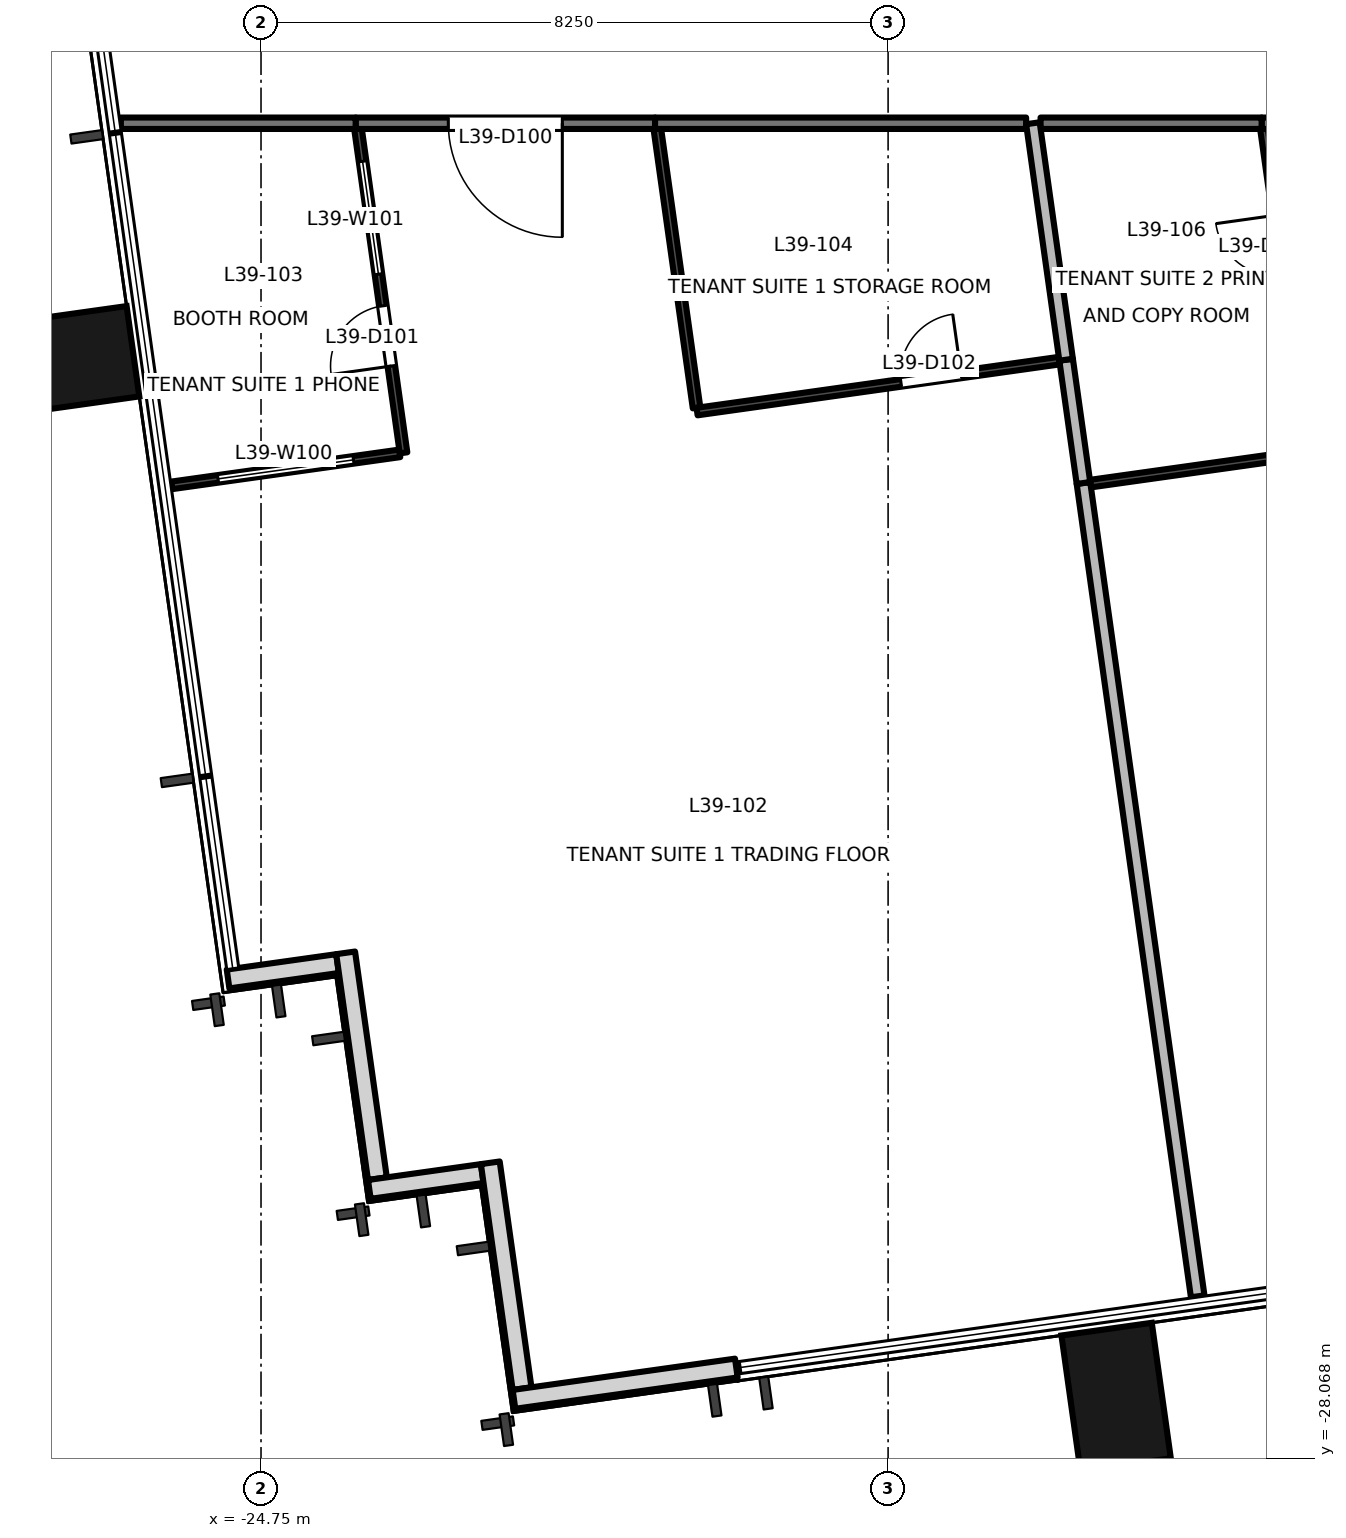
"""IFC4 building model, lengths in metres.
Left out: names, types, materials, properties, quantities, classifications, styles, units other than length and angle.
Written with IfcOpenShell. Run it as: python <this file> out.ifc"""

import sys

from ifc_helpers import new_model, si_unit, direction, frame, frame_2d, origin, origin_2d, place, context, subcontext, project, spatial, rectangle, extrude, element, fill, save


model = new_model("IFC4")
c1 = context("Model", 3, precision=1e-05, world=origin(), true_north=direction((0.0, 1.0)))
c2 = subcontext(c1, "Body", "Model", "MODEL_VIEW")
j1 = project(units=[si_unit("LENGTHUNIT", "METRE"), si_unit("PLANEANGLEUNIT", "RADIAN")], contexts=[c1])
p1 = place(None, origin())
s1 = spatial("IfcSite", under=j1, at=p1, CompositionType="ELEMENT")
p2 = place(p1, origin())
s2 = spatial("IfcBuilding", under=s1, at=p2, CompositionType="ELEMENT")
p3 = place(p2, frame((0.0, 0.0, 172.4)))
s3 = spatial("IfcBuildingStorey", under=s2, at=p3, CompositionType="ELEMENT", Elevation=172.4)
for number, where, z_axis, x_axis in (
    (1, (-13.5, -27.256, -0.2), (0.0, 0.0, 1.0), (0.99, 0.139, 0.0)),
    (2, (-27.326, -13.625, -0.2), (0.0, 0.0, 1.0), (-0.139, 0.99, 0.0)),
):
    element("IfcColumn", number, at=place(p3, frame(where, z_axis=z_axis, x_axis=x_axis)), inside=s3, PredefinedType="COLUMN", context=c2, shape_type="SweptSolid", body=[
        extrude(rectangle(XDim=1.2, YDim=1.8, at=origin_2d()), origin(), (0.0, 0.0, 1.0), 3.9),
    ])
p4 = place(p3, frame((-25.184, -21.758, 0.0), z_axis=(0.0, 0.0, 1.0), x_axis=(0.9902493448, 0.13930626376, 0.0)))
e3 = element("IfcWall", 3, at=p4, inside=s3, PredefinedType="SOLIDWALL", context=c2, shape_type="SweptSolid", body=[
    extrude(rectangle(XDim=1.455, YDim=0.25, at=frame_2d((0.727, 0.0))), origin(), (0.0, 0.0, 1.0), 3.7),
])
p5 = place(p3, frame((-23.637, -21.414, 0.0), z_axis=(0.0, 0.0, 1.0), x_axis=(0.139313431826, -0.990248336385, 0.0)))
e4 = element("IfcWall", 4, at=p5, inside=s3, PredefinedType="SOLIDWALL", context=c2, shape_type="SweptSolid", body=[
    extrude(rectangle(XDim=3.0, YDim=0.25, at=frame_2d((1.5, 0.0))), origin(), (0.0, 0.0, 1.0), 3.7),
])
p6 = place(p3, frame((-23.325, -24.526, 0.0), z_axis=(0.0, 0.0, 1.0), x_axis=(0.990243596651, 0.13934711799, 0.0)))
e5 = element("IfcWall", 5, at=p6, inside=s3, PredefinedType="SOLIDWALL", context=c2, shape_type="SweptSolid", body=[
    extrude(rectangle(XDim=1.5, YDim=0.25, at=frame_2d((0.75, 0.0))), origin(), (0.0, 0.0, 1.0), 3.7),
])
p7 = place(p3, frame((-21.734, -24.176, 0.0), z_axis=(0.0, 0.0, 1.0), x_axis=(0.139313431826, -0.990248336385, 0.0)))
e6 = element("IfcWall", 6, at=p7, inside=s3, PredefinedType="SOLIDWALL", context=c2, shape_type="SweptSolid", body=[
    extrude(rectangle(XDim=3.0, YDim=0.25, at=frame_2d((1.5, 0.0))), origin(), (0.0, 0.0, 1.0), 3.7),
])
p8 = place(p3, frame((-21.422, -27.288, 0.0), z_axis=(0.0, 0.0, 1.0), x_axis=(0.990246427036, 0.139327002919, 0.0)))
e7 = element("IfcWall", 7, at=p8, inside=s3, PredefinedType="SOLIDWALL", context=c2, shape_type="SweptSolid", body=[
    extrude(rectangle(XDim=2.954, YDim=0.25, at=frame_2d((1.477, 0.0))), origin(), (0.0, 0.0, 1.0), 3.7),
])
p9 = place(p3, frame((-19.566, -10.5, 0.0), z_axis=(0.0, 0.0, 1.0), x_axis=(-1.0, 0.0, 0.0)))
e8 = element("IfcWall", 8, at=p9, inside=s3, PredefinedType="PARTITIONING", context=c2, shape_type="SweptSolid", body=[
    extrude(rectangle(XDim=3.939, YDim=0.15, at=frame_2d((1.969, 0.0))), origin(), (0.0, 0.0, 1.0), 3.7),
])
p10 = place(p9, frame((1.22, 0.0, 0.0)))
e9 = element("IfcOpeningElement", 9, at=p10, cuts=e8, PredefinedType="OPENING", context=c2, shape_type="SweptSolid", body=[
    extrude(rectangle(XDim=1.5, YDim=2.1, at=frame_2d((0.75, 1.05))), frame((0.0, 0.085, 0.0), z_axis=(0.0, -1.0, 0.0), x_axis=(1.0, 0.0, 0.0)), (0.0, 0.0, 1.0), 0.171),
])
p11 = place(p3, frame((-23.505, -10.5, 0.0), z_axis=(0.0, 0.0, 1.0), x_axis=(-1.0, 0.0, 0.0)))
e10 = element("IfcWall", 10, at=p11, inside=s3, PredefinedType="PARTITIONING", context=c2, shape_type="SweptSolid", body=[
    extrude(rectangle(XDim=3.089, YDim=0.15, at=frame_2d((1.544, 0.0))), origin(), (0.0, 0.0, 1.0), 3.7),
])
p12 = place(p3, frame((-14.684, -10.5, 0.0), z_axis=(0.0, 0.0, 1.0), x_axis=(-1.0, 0.0, 0.0)))
e11 = element("IfcWall", 11, at=p12, inside=s3, PredefinedType="PARTITIONING", context=c2, shape_type="SweptSolid", body=[
    extrude(rectangle(XDim=4.882, YDim=0.15, at=frame_2d((2.441, 0.0))), origin(), (0.0, 0.0, 1.0), 3.7),
])
p13 = place(p3, frame((-7.648, -10.5, 0.0), z_axis=(0.0, 0.0, 1.0), x_axis=(-1.0, 0.0, 0.0)))
e12 = element("IfcWall", 12, at=p13, inside=s3, PredefinedType="PARTITIONING", context=c2, shape_type="SweptSolid", body=[
    extrude(rectangle(XDim=3.938, YDim=0.15, at=frame_2d((1.969, 0.0))), origin(), (0.0, 0.0, 1.0), 2.8),
])
p14 = place(p3, frame((-11.586, -10.5, 0.0), z_axis=(0.0, 0.0, 1.0), x_axis=(-1.0, 0.0, 0.0)))
e13 = element("IfcWall", 13, at=p14, inside=s3, PredefinedType="PARTITIONING", context=c2, shape_type="SweptSolid", body=[
    extrude(rectangle(XDim=2.908, YDim=0.15, at=frame_2d((1.454, 0.0))), origin(), (0.0, 0.0, 1.0), 2.8),
])
p15 = place(p3, frame((-25.925, -15.264, 0.0), z_axis=(0.0, 0.0, 1.0), x_axis=(0.990300981683, 0.138938711948, 0.0)))
e14 = element("IfcWall", 14, at=p15, inside=s3, PredefinedType="PARTITIONING", context=c2, shape_type="SweptSolid", body=[
    extrude(rectangle(XDim=3.029, YDim=0.1, at=frame_2d((1.515, 0.0))), origin(), (0.0, 0.0, 1.0), 3.7),
])
p16 = place(p15, frame((0.615, 0.0, 0.9)))
e15 = element("IfcOpeningElement", 15, at=p16, cuts=e14, PredefinedType="OPENING", context=c2, shape_type="SweptSolid", body=[
    extrude(rectangle(XDim=1.8, YDim=1.2, at=frame_2d((0.9, 0.6))), frame((0.0, 0.061, 0.0), z_axis=(0.0, -1.0, 0.0), x_axis=(1.0, 0.0, 0.0)), (0.0, 0.0, 1.0), 0.121),
])
p17 = place(p3, frame((-22.875, -14.836, 0.0), z_axis=(0.0, 0.0, 1.0), x_axis=(-0.139240076126, 0.990258653686, 0.0)))
e16 = element("IfcWall", 16, at=p17, inside=s3, PredefinedType="PARTITIONING", context=c2, shape_type="SweptSolid", body=[
    extrude(rectangle(XDim=4.31, YDim=0.1, at=frame_2d((2.155, 0.0))), origin(), (0.0, 0.0, 1.0), 3.7),
])
p18 = place(p17, frame((1.153, 0.0, 0.0)))
e17 = element("IfcOpeningElement", 17, at=p18, cuts=e16, PredefinedType="OPENING", context=c2, shape_type="SweptSolid", body=[
    extrude(rectangle(XDim=0.8, YDim=2.1, at=frame_2d((0.4, 1.05))), frame((0.0, 0.061, 0.0), z_axis=(0.0, -1.0, 0.0), x_axis=(1.0, 0.0, 0.0)), (0.0, 0.0, 1.0), 0.121),
])
p19 = place(p17, frame((2.373, 0.0, 0.9)))
e18 = element("IfcOpeningElement", 18, at=p19, cuts=e16, PredefinedType="OPENING", context=c2, shape_type="SweptSolid", body=[
    extrude(rectangle(XDim=1.5, YDim=1.2, at=frame_2d((0.75, 0.6))), frame((0.0, 0.061, 0.0), z_axis=(0.0, -1.0, 0.0), x_axis=(1.0, 0.0, 0.0)), (0.0, 0.0, 1.0), 0.121),
])
p20 = place(p3, frame((-19.537, -10.568, 0.0), z_axis=(0.0, 0.0, 1.0), x_axis=(0.139303202992, -0.990249775378, 0.0)))
e19 = element("IfcWall", 19, at=p20, inside=s3, PredefinedType="PARTITIONING", context=c2, shape_type="SweptSolid", body=[
    extrude(rectangle(XDim=3.712, YDim=0.1, at=frame_2d((1.856, 0.0))), origin(), (0.0, 0.0, 1.0), 3.7),
])
p21 = place(p3, frame((-19.013, -14.293, 0.0), z_axis=(0.0, 0.0, 1.0), x_axis=(0.990264556242, 0.139198091406, 0.0)))
e20 = element("IfcWall", 20, at=p21, inside=s3, PredefinedType="PARTITIONING", context=c2, shape_type="SweptSolid", body=[
    extrude(rectangle(XDim=4.813, YDim=0.1, at=frame_2d((2.406, 0.0))), origin(), (0.0, 0.0, 1.0), 3.7),
])
p22 = place(p21, frame((2.709, 0.0, 0.0)))
e21 = element("IfcOpeningElement", 21, at=p22, cuts=e20, PredefinedType="OPENING", context=c2, shape_type="SweptSolid", body=[
    extrude(rectangle(XDim=0.8, YDim=2.1, at=frame_2d((0.4, 1.05))), frame((0.0, 0.061, 0.0), z_axis=(0.0, -1.0, 0.0), x_axis=(1.0, 0.0, 0.0)), (0.0, 0.0, 1.0), 0.121),
])
p23 = place(p3, frame((-13.93, -15.233, 0.0), z_axis=(0.0, 0.0, 1.0), x_axis=(0.139092809985, -0.990279349583, 0.0)))
e22 = element("IfcWall", 22, at=p23, inside=s3, PredefinedType="PARTITIONING", context=c2, shape_type="SweptSolid", body=[
    extrude(rectangle(XDim=10.805, YDim=0.18, at=frame_2d((5.403, 0.0))), origin(), (0.0, 0.0, 1.0), 2.8),
])
p24 = place(p3, frame((-14.158, -13.611, 0.0), z_axis=(0.0, 0.0, 1.0), x_axis=(0.139229707098, -0.990260111618, 0.0)))
e23 = element("IfcWall", 23, at=p24, inside=s3, PredefinedType="PARTITIONING", context=c2, shape_type="SweptSolid", body=[
    extrude(rectangle(XDim=1.638, YDim=0.18, at=frame_2d((0.819, 0.0))), origin(), (0.0, 0.0, 1.0), 3.7),
])
p25 = place(p3, frame((-14.595, -10.5, 0.0), z_axis=(0.0, 0.0, 1.0), x_axis=(0.139103611391, -0.990277832377, 0.0)))
e24 = element("IfcWall", 24, at=p25, inside=s3, PredefinedType="PARTITIONING", context=c2, shape_type="SweptSolid", body=[
    extrude(rectangle(XDim=3.142, YDim=0.18, at=frame_2d((1.571, 0.0))), origin(), (0.0, 0.0, 1.0), 3.7),
])
p26 = place(p3, frame((-13.838, -15.241, 0.0), z_axis=(0.0, 0.0, 1.0), x_axis=(0.990263018372, 0.139209031475, 0.0)))
e25 = element("IfcWall", 25, at=p26, inside=s3, PredefinedType="PARTITIONING", context=c2, shape_type="SweptSolid", body=[
    extrude(rectangle(XDim=2.859, YDim=0.1, at=frame_2d((1.429, 0.0))), origin(), (0.0, 0.0, 1.0), 2.8),
])
p27 = place(p3, frame((-10.957, -14.836, 0.0), z_axis=(0.0, 0.0, 1.0), x_axis=(-0.138962312518, 0.990297670249, 0.0)))
e26 = element("IfcWall", 26, at=p27, inside=s3, PredefinedType="PARTITIONING", context=c2, shape_type="SweptSolid", body=[
    extrude(rectangle(XDim=4.31, YDim=0.1, at=frame_2d((2.155, 0.0))), origin(), (0.0, 0.0, 1.0), 3.7),
])
p28 = place(p27, frame((2.357, 0.0, 0.0)))
e27 = element("IfcOpeningElement", 27, at=p28, cuts=e26, PredefinedType="OPENING", context=c2, shape_type="SweptSolid", body=[
    extrude(rectangle(XDim=0.8, YDim=2.1, at=frame_2d((0.4, 1.05))), frame((0.0, 0.061, 0.0), z_axis=(0.0, -1.0, 0.0), x_axis=(1.0, 0.0, 0.0)), (0.0, 0.0, 1.0), 0.121),
])
p29 = place(p10, origin())
e28 = element("IfcDoor", 28, at=p29, inside=s3, OperationType="DOUBLE_DOOR_SINGLE_SWING", PredefinedType="DOOR", context=c2, shape_type="SweptSolid", body=[
    extrude(rectangle(XDim=1.5, YDim=2.1, at=frame_2d((0.75, 1.05))), frame((0.0, 0.025, 0.0), z_axis=(0.0, -1.0, 0.0), x_axis=(1.0, 0.0, 0.0)), (0.0, 0.0, 1.0), 0.05),
])
fill(e9, e28)
p30 = place(p18, origin())
e29 = element("IfcDoor", 29, at=p30, inside=s3, OperationType="SINGLE_SWING_LEFT", PredefinedType="DOOR", context=c2, shape_type="SweptSolid", body=[
    extrude(rectangle(XDim=0.8, YDim=2.1, at=frame_2d((0.4, 1.05))), frame((0.0, 0.025, 0.0), z_axis=(0.0, -1.0, 0.0), x_axis=(1.0, 0.0, 0.0)), (0.0, 0.0, 1.0), 0.05),
])
fill(e17, e29)
p31 = place(p22, origin())
e30 = element("IfcDoor", 30, at=p31, inside=s3, OperationType="SINGLE_SWING_RIGHT", PredefinedType="DOOR", context=c2, shape_type="SweptSolid", body=[
    extrude(rectangle(XDim=0.8, YDim=2.1, at=frame_2d((0.4, 1.05))), frame((0.0, 0.025, 0.0), z_axis=(0.0, -1.0, 0.0), x_axis=(1.0, 0.0, 0.0)), (0.0, 0.0, 1.0), 0.05),
])
fill(e21, e30)
p32 = place(p16, origin())
e31 = element("IfcWindow", 31, at=p32, inside=s3, PartitioningType="SINGLE_PANEL", PredefinedType="WINDOW", context=c2, shape_type="SweptSolid", body=[
    extrude(rectangle(XDim=1.8, YDim=1.2, at=frame_2d((0.9, 0.6))), frame((0.0, 0.03, 0.0), z_axis=(0.0, -1.0, 0.0), x_axis=(1.0, 0.0, 0.0)), (0.0, 0.0, 1.0), 0.06),
])
fill(e15, e31)
p33 = place(p19, origin())
e32 = element("IfcWindow", 32, at=p33, inside=s3, PartitioningType="SINGLE_PANEL", PredefinedType="WINDOW", context=c2, shape_type="SweptSolid", body=[
    extrude(rectangle(XDim=1.5, YDim=1.2, at=frame_2d((0.75, 0.6))), frame((0.0, 0.03, 0.0), z_axis=(0.0, -1.0, 0.0), x_axis=(1.0, 0.0, 0.0)), (0.0, 0.0, 1.0), 0.06),
])
fill(e18, e32)
save(model, sys.argv[1])
